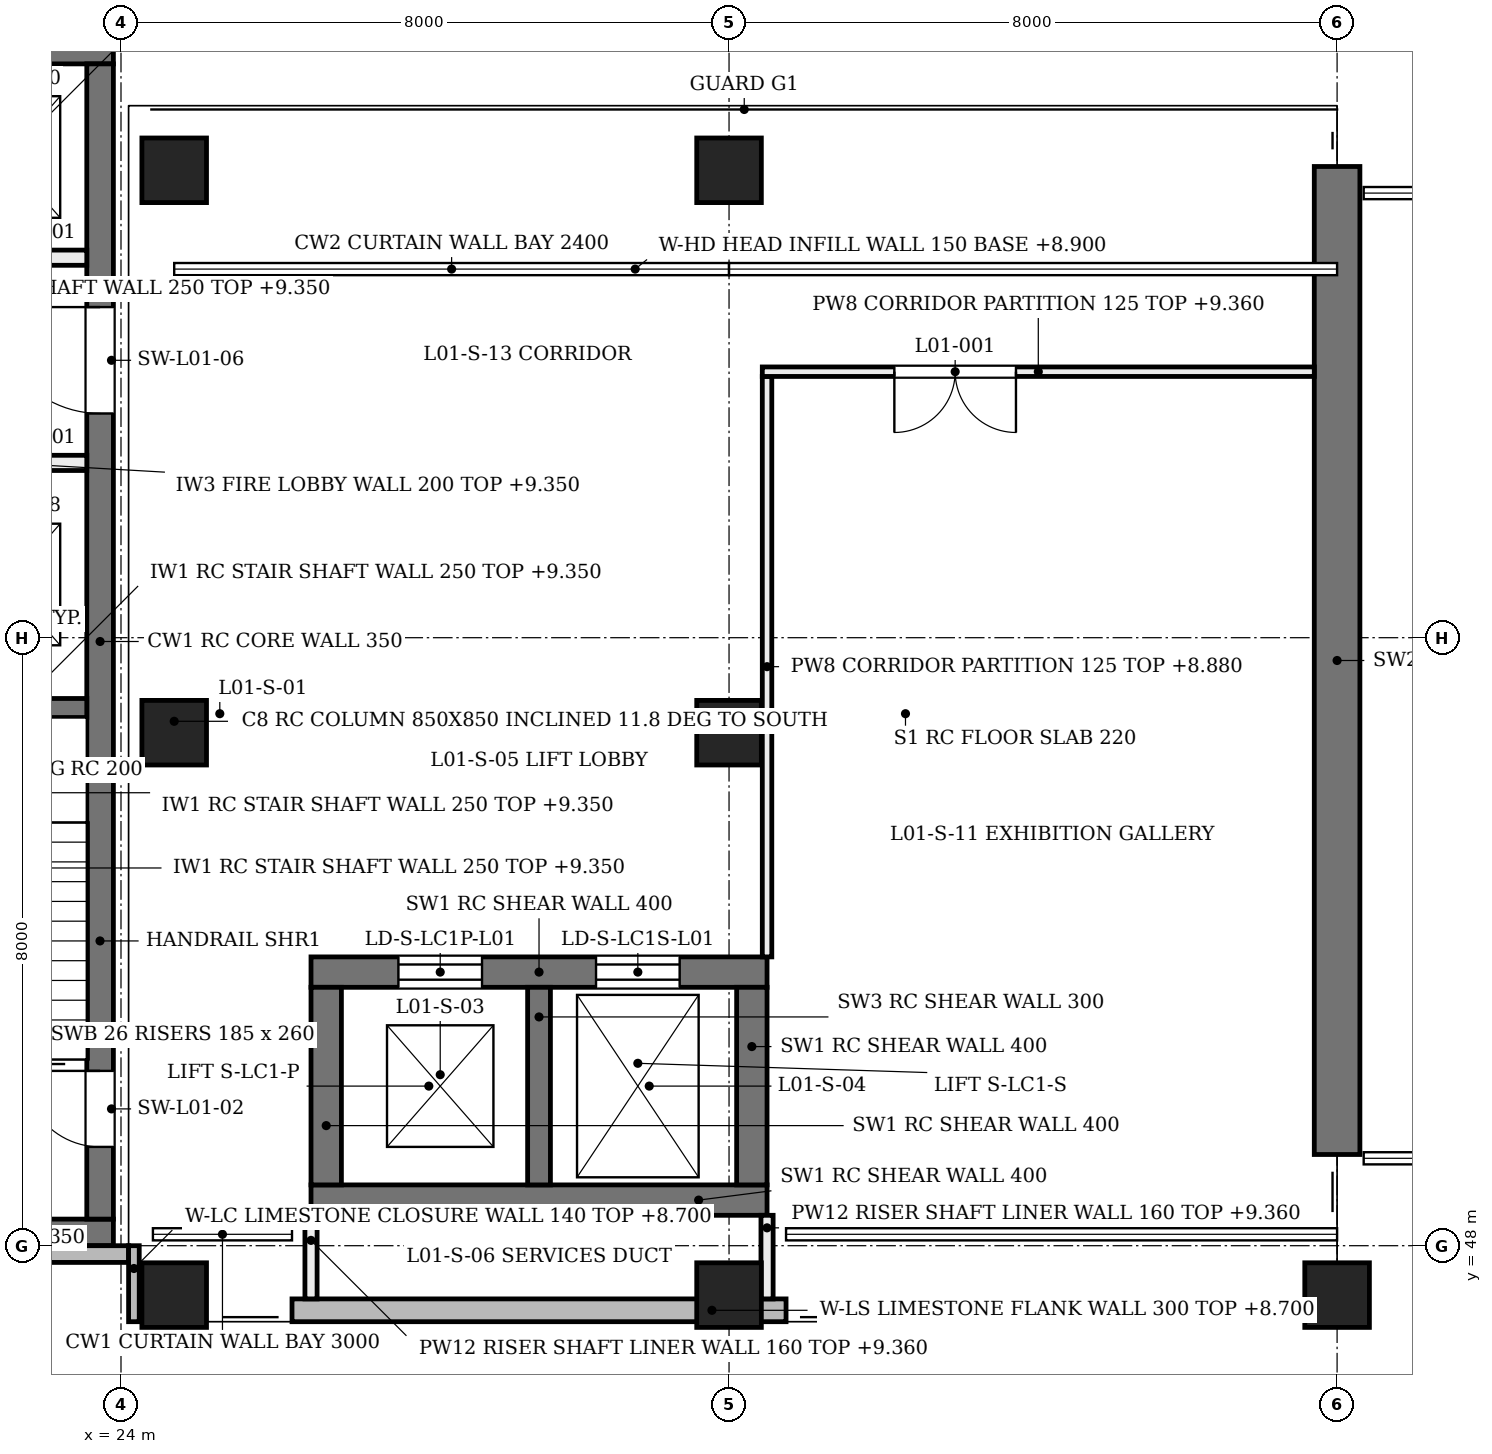
"""IFC4 building model, lengths in metres.
Left out: names, types, materials, properties, quantities, classifications, styles, units other than length and angle.
Written with IfcOpenShell. Run it as: python <this file> out.ifc"""

import sys

from ifc_helpers import new_model, si_unit, direction, frame, frame_2d, origin, origin_2d, place, context, subcontext, project, spatial, rectangle, extrude, element, fill, save


model = new_model("IFC4")
c1 = context("Model", 3, precision=1e-05, world=origin(), true_north=direction((0.0, 1.0)))
c2 = subcontext(c1, "Body", "Model", "MODEL_VIEW")
j1 = project(units=[si_unit("LENGTHUNIT", "METRE"), si_unit("PLANEANGLEUNIT", "RADIAN")], contexts=[c1])
p1 = place(None, origin())
s1 = spatial("IfcSite", under=j1, at=p1, CompositionType="ELEMENT")
p2 = place(p1, origin())
s2 = spatial("IfcBuilding", under=s1, at=p2, CompositionType="ELEMENT")
p3 = place(p2, frame((0.0, 0.0, 4.8)))
s3 = spatial("IfcBuildingStorey", under=s2, at=p3, CompositionType="ELEMENT", Elevation=4.8)
p4 = place(p3, frame((26.5, 48.6, 0.0), z_axis=(0.0, 0.0, 1.0), x_axis=(1.0, 0.0, 0.0)))
e1 = element("IfcWall", 1, at=p4, inside=s3, PredefinedType="SHEAR", context=c2, shape_type="SweptSolid", body=[
    extrude(rectangle(XDim=6.0, YDim=0.4, at=frame_2d((3.0, 0.0))), origin(), (0.0, 0.0, 1.0), 4.58),
])
p5 = place(p3, frame((26.5, 51.6, 0.0), z_axis=(0.0, 0.0, 1.0), x_axis=(1.0, 0.0, 0.0)))
e2 = element("IfcWall", 2, at=p5, inside=s3, PredefinedType="SHEAR", context=c2, shape_type="SweptSolid", body=[
    extrude(rectangle(XDim=6.0, YDim=0.4, at=frame_2d((3.0, 0.0))), origin(), (0.0, 0.0, 1.0), 4.58),
])
p6 = place(p5, frame((1.15, 0.0, 0.0)))
e3 = element("IfcOpeningElement", 3, at=p6, cuts=e2, PredefinedType="OPENING", context=c2, shape_type="SweptSolid", body=[
    extrude(rectangle(XDim=1.1, YDim=2.1, at=frame_2d((0.55, 1.05))), frame((0.0, 0.21, 0.0), z_axis=(0.0, -1.0, 0.0), x_axis=(1.0, 0.0, 0.0)), (0.0, 0.0, 1.0), 0.42),
])
p7 = place(p5, frame((3.75, 0.0, 0.0)))
e4 = element("IfcOpeningElement", 4, at=p7, cuts=e2, PredefinedType="OPENING", context=c2, shape_type="SweptSolid", body=[
    extrude(rectangle(XDim=1.1, YDim=2.1, at=frame_2d((0.55, 1.05))), frame((0.0, 0.21, 0.0), z_axis=(0.0, -1.0, 0.0), x_axis=(1.0, 0.0, 0.0)), (0.0, 0.0, 1.0), 0.42),
])
for number, where, z_axis, x_axis in (
    (5, (26.7, 48.8, 0.0), (0.0, 0.0, 1.0), (0.0, 1.0, 0.0)),
    (6, (32.3, 48.8, 0.0), (0.0, 0.0, 1.0), (0.0, 1.0, 0.0)),
):
    element("IfcWall", number, at=place(p3, frame(where, z_axis=z_axis, x_axis=x_axis)), inside=s3, PredefinedType="SHEAR", context=c2, shape_type="SweptSolid", body=[
        extrude(rectangle(XDim=2.6, YDim=0.4, at=frame_2d((1.3, 0.0))), origin(), (0.0, 0.0, 1.0), 4.58),
    ])
p8 = place(p3, frame((29.5, 48.8, 0.0), z_axis=(0.0, 0.0, 1.0), x_axis=(0.0, 1.0, 0.0)))
e7 = element("IfcWall", 7, at=p8, inside=s3, PredefinedType="SHEAR", context=c2, shape_type="SweptSolid", body=[
    extrude(rectangle(XDim=2.6, YDim=0.3, at=frame_2d((1.3, 0.0))), origin(), (0.0, 0.0, 1.0), 4.58),
])
p9 = place(p3, frame((40.0, 49.2, 0.0), z_axis=(0.0, 0.0, 1.0), x_axis=(0.0, 1.0, 0.0)))
e8 = element("IfcWall", 8, at=p9, inside=s3, PredefinedType="SHEAR", context=c2, shape_type="SweptSolid", body=[
    extrude(rectangle(XDim=13.0, YDim=0.6, at=frame_2d((6.5, 0.0))), origin(), (0.0, 0.0, 1.0), 4.58),
])
for number, where, z_axis, x_axis in (
    (9, (16.0, 48.175, 0.0), (0.0, 0.0, 1.0), (1.0, 0.0, 0.0)),
    (10, (16.0, 63.725, 0.0), (0.0, 0.0, 1.0), (1.0, 0.0, 0.0)),
):
    element("IfcWall", number, at=place(p3, frame(where, z_axis=z_axis, x_axis=x_axis)), inside=s3, PredefinedType="SHEAR", context=c2, shape_type="SweptSolid", body=[
        extrude(rectangle(XDim=7.9, YDim=0.35, at=frame_2d((3.95, 0.0))), origin(), (0.0, 0.0, 1.0), 4.58),
    ])
p10 = place(p3, frame((23.725, 48.35, 0.0), z_axis=(0.0, 0.0, 1.0), x_axis=(0.0, 1.0, 0.0)))
e11 = element("IfcWall", 11, at=p10, inside=s3, PredefinedType="SHEAR", context=c2, shape_type="SweptSolid", body=[
    extrude(rectangle(XDim=15.2, YDim=0.35, at=frame_2d((7.6, 0.0))), origin(), (0.0, 0.0, 1.0), 4.58),
])
p11 = place(p10, frame((0.95, 0.0, 0.0)))
e12 = element("IfcOpeningElement", 12, at=p11, cuts=e11, PredefinedType="OPENING", context=c2, shape_type="SweptSolid", body=[
    extrude(rectangle(XDim=1.0, YDim=2.1, at=frame_2d((0.5, 1.05))), frame((0.0, 0.185, 0.0), z_axis=(0.0, -1.0, 0.0), x_axis=(1.0, 0.0, 0.0)), (0.0, 0.0, 1.0), 0.37),
])
p12 = place(p10, frame((10.6, 0.0, 0.0)))
e13 = element("IfcOpeningElement", 13, at=p12, cuts=e11, PredefinedType="OPENING", context=c2, shape_type="SweptSolid", body=[
    extrude(rectangle(XDim=1.4, YDim=2.1, at=frame_2d((0.7, 1.05))), frame((0.0, 0.185, 0.0), z_axis=(0.0, -1.0, 0.0), x_axis=(1.0, 0.0, 0.0)), (0.0, 0.0, 1.0), 0.37),
])
for number, where, z_axis, x_axis in (
    (14, (24.7, 47.6, 0.0), (0.0, -0.204, 0.979), (1.0, 0.0, 0.0)),
    (15, (32.0, 47.6, 0.0), (0.0, -0.204, 0.979), (1.0, 0.0, 0.0)),
    (16, (40.0, 47.6, 0.0), (0.0, -0.204, 0.979), (1.0, 0.0, 0.0)),
    (17, (24.7, 55.0, 0.0), (0.0, -0.204, 0.979), (1.0, 0.0, 0.0)),
    (18, (32.0, 55.0, 0.0), (0.0, -0.204, 0.979), (1.0, 0.0, 0.0)),
    (19, (24.7, 62.4, 0.0), (0.0, -0.204, 0.979), (1.0, 0.0, 0.0)),
    (20, (32.0, 62.4, 0.0), (0.0, -0.204, 0.979), (1.0, 0.0, 0.0)),
):
    element("IfcColumn", number, at=place(p3, frame(where, z_axis=z_axis, x_axis=x_axis)), inside=s3, PredefinedType="COLUMN", context=c2, shape_type="SweptSolid", body=[
        extrude(rectangle(XDim=0.85, YDim=0.85, at=origin_2d()), origin(), (0.0, 0.0, 1.0), 4.903),
    ])
p13 = place(p3, frame((26.25, 47.15, 0.0), z_axis=(0.0, 0.0, 1.0), x_axis=(1.0, 0.0, 0.0)))
e21 = element("IfcWall", 21, at=p13, inside=s3, PredefinedType="SOLIDWALL", context=c2, shape_type="SweptSolid", body=[
    extrude(rectangle(XDim=6.5, YDim=0.3, at=frame_2d((3.25, 0.0))), origin(), (0.0, 0.0, 1.0), 3.9),
])
p14 = place(p3, frame((24.9, 60.85, 4.1), z_axis=(0.0, 0.0, 1.0), x_axis=(1.0, 0.0, 0.0)))
e22 = element("IfcWall", 22, at=p14, inside=s3, PredefinedType="SOLIDWALL", context=c2, shape_type="SweptSolid", body=[
    extrude(rectangle(XDim=6.9, YDim=0.15, at=frame_2d((3.45, 0.0))), origin(), (0.0, 0.0, 1.0), 0.48),
])
p15 = place(p3, frame((15.9, 47.89, 0.0), z_axis=(0.0, 0.0, 1.0), x_axis=(1.0, 0.0, 0.0)))
e23 = element("IfcWall", 23, at=p15, inside=s3, PredefinedType="SOLIDWALL", context=c2, shape_type="SweptSolid", body=[
    extrude(rectangle(XDim=8.2, YDim=0.22, at=frame_2d((4.1, 0.0))), origin(), (0.0, 0.0, 1.0), 3.9),
])
p16 = place(p15, frame((1.108, 0.0, 0.9)))
e24 = element("IfcOpeningElement", 24, at=p16, cuts=e23, PredefinedType="OPENING", context=c2, shape_type="SweptSolid", body=[
    extrude(rectangle(XDim=0.45, YDim=2.6, at=frame_2d((0.225, 1.3))), frame((0.0, 0.12, 0.0), z_axis=(0.0, -1.0, 0.0), x_axis=(1.0, 0.0, 0.0)), (0.0, 0.0, 1.0), 0.24),
])
p17 = place(p15, frame((3.775, 0.0, 0.9)))
e25 = element("IfcOpeningElement", 25, at=p17, cuts=e23, PredefinedType="OPENING", context=c2, shape_type="SweptSolid", body=[
    extrude(rectangle(XDim=0.45, YDim=2.6, at=frame_2d((0.225, 1.3))), frame((0.0, 0.12, 0.0), z_axis=(0.0, -1.0, 0.0), x_axis=(1.0, 0.0, 0.0)), (0.0, 0.0, 1.0), 0.24),
])
p18 = place(p15, frame((6.442, 0.0, 0.9)))
e26 = element("IfcOpeningElement", 26, at=p18, cuts=e23, PredefinedType="OPENING", context=c2, shape_type="SweptSolid", body=[
    extrude(rectangle(XDim=0.45, YDim=2.6, at=frame_2d((0.225, 1.3))), frame((0.0, 0.12, 0.0), z_axis=(0.0, -1.0, 0.0), x_axis=(1.0, 0.0, 0.0)), (0.0, 0.0, 1.0), 0.24),
])
p19 = place(p3, frame((24.17, 47.0, 0.0), z_axis=(0.0, 0.0, 1.0), x_axis=(0.0, 1.0, 0.0)))
e27 = element("IfcWall", 27, at=p19, inside=s3, PredefinedType="SOLIDWALL", context=c2, shape_type="SweptSolid", body=[
    extrude(rectangle(XDim=1.0, YDim=0.14, at=frame_2d((0.5, 0.0))), origin(), (0.0, 0.0, 1.0), 3.9),
])
p20 = place(p3, frame((20.45, 55.075, 0.0), z_axis=(0.0, 0.0, 1.0), x_axis=(1.0, 0.0, 0.0)))
e28 = element("IfcWall", 28, at=p20, inside=s3, PredefinedType="SOLIDWALL", context=c2, shape_type="SweptSolid", body=[
    extrude(rectangle(XDim=3.1, YDim=0.25, at=frame_2d((1.55, 0.0))), origin(), (0.0, 0.0, 1.0), 4.55),
])
p21 = place(p3, frame((16.35, 58.3, 0.0), z_axis=(0.0, 0.0, 1.0), x_axis=(1.0, 0.0, 0.0)))
e29 = element("IfcWall", 29, at=p21, inside=s3, PredefinedType="SOLIDWALL", context=c2, shape_type="SweptSolid", body=[
    extrude(rectangle(XDim=7.2, YDim=0.2, at=frame_2d((3.6, 0.0))), origin(), (0.0, 0.0, 1.0), 4.55),
])
p22 = place(p21, frame((0.5, 0.0, 0.0)))
e30 = element("IfcOpeningElement", 30, at=p22, cuts=e29, PredefinedType="OPENING", context=c2, shape_type="SweptSolid", body=[
    extrude(rectangle(XDim=1.1, YDim=2.1, at=frame_2d((0.55, 1.05))), frame((0.0, 0.11, 0.0), z_axis=(0.0, -1.0, 0.0), x_axis=(1.0, 0.0, 0.0)), (0.0, 0.0, 1.0), 0.22),
])
p23 = place(p21, frame((5.6, 0.0, 0.0)))
e31 = element("IfcOpeningElement", 31, at=p23, cuts=e29, PredefinedType="OPENING", context=c2, shape_type="SweptSolid", body=[
    extrude(rectangle(XDim=1.1, YDim=2.1, at=frame_2d((0.55, 1.05))), frame((0.0, 0.11, 0.0), z_axis=(0.0, -1.0, 0.0), x_axis=(1.0, 0.0, 0.0)), (0.0, 0.0, 1.0), 0.22),
])
p24 = place(p21, frame((3.1, 0.0, 0.0)))
e32 = element("IfcOpeningElement", 32, at=p24, cuts=e29, PredefinedType="OPENING", context=c2, shape_type="SweptSolid", body=[
    extrude(rectangle(XDim=1.0, YDim=2.1, at=frame_2d((0.5, 1.05))), frame((0.0, 0.11, 0.0), z_axis=(0.0, -1.0, 0.0), x_axis=(1.0, 0.0, 0.0)), (0.0, 0.0, 1.0), 0.22),
])
p25 = place(p3, frame((16.35, 61.0, 0.0), z_axis=(0.0, 0.0, 1.0), x_axis=(1.0, 0.0, 0.0)))
e33 = element("IfcWall", 33, at=p25, inside=s3, PredefinedType="SOLIDWALL", context=c2, shape_type="SweptSolid", body=[
    extrude(rectangle(XDim=7.2, YDim=0.2, at=frame_2d((3.6, 0.0))), origin(), (0.0, 0.0, 1.0), 4.55),
])
p26 = place(p25, frame((0.5, 0.0, 0.0)))
e34 = element("IfcOpeningElement", 34, at=p26, cuts=e33, PredefinedType="OPENING", context=c2, shape_type="SweptSolid", body=[
    extrude(rectangle(XDim=1.1, YDim=2.1, at=frame_2d((0.55, 1.05))), frame((0.0, 0.11, 0.0), z_axis=(0.0, -1.0, 0.0), x_axis=(1.0, 0.0, 0.0)), (0.0, 0.0, 1.0), 0.22),
])
p27 = place(p25, frame((5.6, 0.0, 0.0)))
e35 = element("IfcOpeningElement", 35, at=p27, cuts=e33, PredefinedType="OPENING", context=c2, shape_type="SweptSolid", body=[
    extrude(rectangle(XDim=1.1, YDim=2.1, at=frame_2d((0.55, 1.05))), frame((0.0, 0.11, 0.0), z_axis=(0.0, -1.0, 0.0), x_axis=(1.0, 0.0, 0.0)), (0.0, 0.0, 1.0), 0.22),
])
p28 = place(p25, frame((3.1, 0.0, 0.0)))
e36 = element("IfcOpeningElement", 36, at=p28, cuts=e33, PredefinedType="OPENING", context=c2, shape_type="SweptSolid", body=[
    extrude(rectangle(XDim=1.0, YDim=2.1, at=frame_2d((0.5, 1.05))), frame((0.0, 0.11, 0.0), z_axis=(0.0, -1.0, 0.0), x_axis=(1.0, 0.0, 0.0)), (0.0, 0.0, 1.0), 0.22),
])
for number, where, z_axis, x_axis in (
    (37, (26.5, 47.3, 0.0), (0.0, 0.0, 1.0), (0.0, 1.0, 0.0)),
    (38, (32.5, 47.3, 0.0), (0.0, 0.0, 1.0), (0.0, 1.0, 0.0)),
):
    element("IfcWall", number, at=place(p3, frame(where, z_axis=z_axis, x_axis=x_axis)), inside=s3, PredefinedType="PARTITIONING", context=c2, shape_type="SweptSolid", body=[
        extrude(rectangle(XDim=1.1, YDim=0.16, at=frame_2d((0.55, 0.0))), origin(), (0.0, 0.0, 1.0), 4.56),
    ])
p29 = place(p3, frame((32.5, 51.8, 0.0), z_axis=(0.0, 0.0, 1.0), x_axis=(0.0, 1.0, 0.0)))
e39 = element("IfcWall", 39, at=p29, inside=s3, PredefinedType="PARTITIONING", context=c2, shape_type="SweptSolid", body=[
    extrude(rectangle(XDim=7.637, YDim=0.125, at=frame_2d((3.819, 0.0))), origin(), (0.0, 0.0, 1.0), 4.08),
])
p30 = place(p3, frame((32.438, 59.5, 0.0), z_axis=(0.0, 0.0, 1.0), x_axis=(1.0, 0.0, 0.0)))
e40 = element("IfcWall", 40, at=p30, inside=s3, PredefinedType="PARTITIONING", context=c2, shape_type="SweptSolid", body=[
    extrude(rectangle(XDim=7.262, YDim=0.125, at=frame_2d((3.631, 0.0))), origin(), (0.0, 0.0, 1.0), 4.56),
])
p31 = place(p30, frame((1.738, 0.0, 0.0)))
e41 = element("IfcOpeningElement", 41, at=p31, cuts=e40, PredefinedType="OPENING", context=c2, shape_type="SweptSolid", body=[
    extrude(rectangle(XDim=1.6, YDim=2.2, at=frame_2d((0.8, 1.1))), frame((0.0, 0.073, 0.0), z_axis=(0.0, -1.0, 0.0), x_axis=(1.0, 0.0, 0.0)), (0.0, 0.0, 1.0), 0.145),
])
p32 = place(p11, frame((1.0, 0.0, 0.0), z_axis=(0.0, 0.0, 1.0), x_axis=(-1.0, 0.0, 0.0)))
e42 = element("IfcDoor", 42, at=p32, inside=s3, OperationType="SINGLE_SWING_RIGHT", PredefinedType="DOOR", context=c2, shape_type="SweptSolid", body=[
    extrude(rectangle(XDim=1.0, YDim=2.1, at=frame_2d((0.5, 1.05))), frame((0.0, 0.025, 0.0), z_axis=(0.0, -1.0, 0.0), x_axis=(1.0, 0.0, 0.0)), (0.0, 0.0, 1.0), 0.05),
])
fill(e12, e42)
p33 = place(p12, frame((1.4, 0.0, 0.0), z_axis=(0.0, 0.0, 1.0), x_axis=(-1.0, 0.0, 0.0)))
e43 = element("IfcDoor", 43, at=p33, inside=s3, OperationType="SINGLE_SWING_RIGHT", PredefinedType="DOOR", context=c2, shape_type="SweptSolid", body=[
    extrude(rectangle(XDim=1.4, YDim=2.1, at=frame_2d((0.7, 1.05))), frame((0.0, 0.025, 0.0), z_axis=(0.0, -1.0, 0.0), x_axis=(1.0, 0.0, 0.0)), (0.0, 0.0, 1.0), 0.05),
])
fill(e13, e43)
p34 = place(p6, origin())
e44 = element("IfcDoor", 44, at=p34, inside=s3, OperationType="DOUBLE_DOOR_SLIDING", PredefinedType="DOOR", context=c2, shape_type="SweptSolid", body=[
    extrude(rectangle(XDim=1.1, YDim=2.1, at=frame_2d((0.55, 1.05))), frame((0.0, 0.025, 0.0), z_axis=(0.0, -1.0, 0.0), x_axis=(1.0, 0.0, 0.0)), (0.0, 0.0, 1.0), 0.05),
])
fill(e3, e44)
p35 = place(p7, origin())
e45 = element("IfcDoor", 45, at=p35, inside=s3, OperationType="DOUBLE_DOOR_SLIDING", PredefinedType="DOOR", context=c2, shape_type="SweptSolid", body=[
    extrude(rectangle(XDim=1.1, YDim=2.1, at=frame_2d((0.55, 1.05))), frame((0.0, 0.025, 0.0), z_axis=(0.0, -1.0, 0.0), x_axis=(1.0, 0.0, 0.0)), (0.0, 0.0, 1.0), 0.05),
])
fill(e4, e45)
p36 = place(p31, frame((1.6, 0.0, 0.0), z_axis=(0.0, 0.0, 1.0), x_axis=(-1.0, 0.0, 0.0)))
e46 = element("IfcDoor", 46, at=p36, inside=s3, OperationType="DOUBLE_DOOR_SINGLE_SWING", PredefinedType="DOOR", context=c2, shape_type="SweptSolid", body=[
    extrude(rectangle(XDim=1.6, YDim=2.2, at=frame_2d((0.8, 1.1))), frame((0.0, 0.025, 0.0), z_axis=(0.0, -1.0, 0.0), x_axis=(1.0, 0.0, 0.0)), (0.0, 0.0, 1.0), 0.05),
])
fill(e41, e46)
save(model, sys.argv[1])
